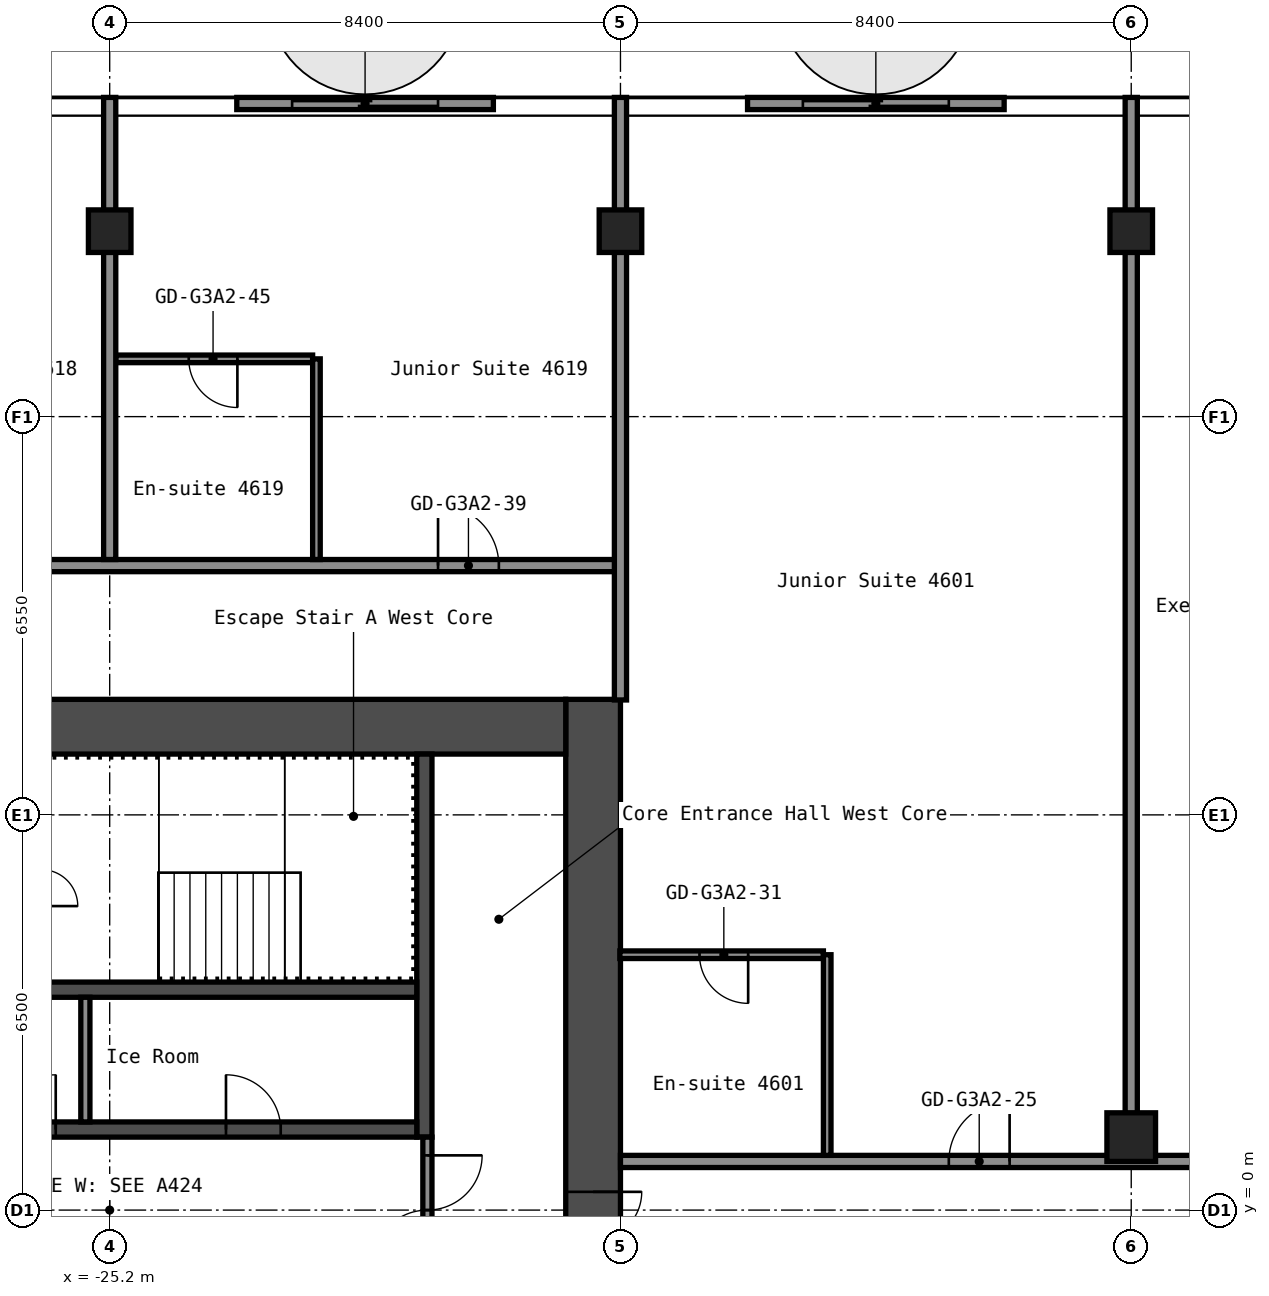
"""IFC4 building model, lengths in metres.
Left out: names, types, materials, properties, quantities, classifications, styles, units other than length and angle.
Written with IfcOpenShell. Run it as: python <this file> out.ifc"""

import sys

from ifc_helpers import new_model, si_unit, direction, frame, frame_2d, origin, origin_2d, place, context, subcontext, project, spatial, rectangle, hollow_rectangle, extrude, element, fill, save


model = new_model("IFC4")
c1 = context("Model", 3, precision=1e-05, world=origin(), true_north=direction((0.0, 1.0)))
c2 = subcontext(c1, "Body", "Model", "MODEL_VIEW")
j1 = project(units=[si_unit("LENGTHUNIT", "METRE"), si_unit("PLANEANGLEUNIT", "RADIAN")], contexts=[c1])
p1 = place(None, origin())
s1 = spatial("IfcSite", under=j1, at=p1, CompositionType="ELEMENT")
p2 = place(p1, origin())
s2 = spatial("IfcBuilding", under=s1, at=p2, CompositionType="ELEMENT")
p3 = place(p2, frame((0.0, 0.0, 163.0)))
s3 = spatial("IfcBuildingStorey", under=s2, at=p3, CompositionType="ELEMENT", Elevation=163.0)
for number, where, z_axis, x_axis in (
    (1, (-25.2, 16.1, 0.0), (0.0, 0.0, 1.0), (1.0, 0.0, 0.0)),
    (2, (-16.8, 16.1, 0.0), (0.0, 0.0, 1.0), (1.0, 0.0, 0.0)),
):
    element("IfcColumn", number, at=place(p3, frame(where, z_axis=z_axis, x_axis=x_axis)), inside=s3, PredefinedType="COLUMN", context=c2, shape_type="SweptSolid", body=[
        extrude(hollow_rectangle(XDim=0.7, YDim=0.7, WallThickness=0.028, at=origin_2d()), origin(), (0.0, 0.0, 1.0), 2.75),
    ])
p4 = place(p3, frame((-8.4, 1.2, 0.0), z_axis=(0.0, 0.0, 1.0), x_axis=(1.0, 0.0, 0.0)))
e3 = element("IfcColumn", 3, at=p4, inside=s3, PredefinedType="COLUMN", context=c2, shape_type="SweptSolid", body=[
    extrude(hollow_rectangle(XDim=0.8, YDim=0.8, WallThickness=0.032, at=origin_2d()), origin(), (0.0, 0.0, 1.0), 2.75),
])
p5 = place(p3, frame((-8.4, 16.1, 0.0), z_axis=(0.0, 0.0, 1.0), x_axis=(1.0, 0.0, 0.0)))
e4 = element("IfcColumn", 4, at=p5, inside=s3, PredefinedType="COLUMN", context=c2, shape_type="SweptSolid", body=[
    extrude(hollow_rectangle(XDim=0.7, YDim=0.7, WallThickness=0.028, at=origin_2d()), origin(), (0.0, 0.0, 1.0), 2.75),
])
p6 = place(p3, frame((-17.25, -8.4, 0.0), z_axis=(0.0, 0.0, 1.0), x_axis=(0.0, 1.0, 0.0)))
e5 = element("IfcWall", 5, at=p6, inside=s3, PredefinedType="SHEAR", context=c2, shape_type="SweptSolid", body=[
    extrude(rectangle(XDim=16.8, YDim=0.9, at=frame_2d((8.4, 0.0))), origin(), (0.0, 0.0, 1.0), 2.75),
])
p7 = place(p6, frame((7.1, 0.0, 0.0)))
e6 = element("IfcOpeningElement", 6, at=p7, cuts=e5, PredefinedType="OPENING", context=c2, shape_type="SweptSolid", body=[
    extrude(rectangle(XDim=1.6, YDim=2.1, at=frame_2d((0.8, 1.05))), frame((0.0, 0.46, 0.0), z_axis=(0.0, -1.0, 0.0), x_axis=(1.0, 0.0, 0.0)), (0.0, 0.0, 1.0), 0.92),
])
p8 = place(p3, frame((-32.7, 7.95, 0.0), z_axis=(0.0, 0.0, 1.0), x_axis=(1.0, 0.0, 0.0)))
e7 = element("IfcWall", 7, at=p8, inside=s3, PredefinedType="SHEAR", context=c2, shape_type="SweptSolid", body=[
    extrude(rectangle(XDim=15.0, YDim=0.9, at=frame_2d((7.5, 0.0))), origin(), (0.0, 0.0, 1.0), 2.75),
])
p9 = place(p8, frame((3.4, 0.0, 0.0)))
e8 = element("IfcOpeningElement", 8, at=p9, cuts=e7, PredefinedType="OPENING", context=c2, shape_type="SweptSolid", body=[
    extrude(rectangle(XDim=1.2, YDim=2.1, at=frame_2d((0.6, 1.05))), frame((0.0, 0.46, 0.0), z_axis=(0.0, -1.0, 0.0), x_axis=(1.0, 0.0, 0.0)), (0.0, 0.0, 1.0), 0.92),
])
p10 = place(p8, frame((0.75, 0.0, 0.0)))
e9 = element("IfcOpeningElement", 9, at=p10, cuts=e7, PredefinedType="OPENING", context=c2, shape_type="SweptSolid", body=[
    extrude(rectangle(XDim=0.9, YDim=2.1, at=frame_2d((0.45, 1.05))), frame((0.0, 0.46, 0.0), z_axis=(0.0, -1.0, 0.0), x_axis=(1.0, 0.0, 0.0)), (0.0, 0.0, 1.0), 0.92),
])
p11 = place(p3, frame((-20.025, 1.2, 0.0), z_axis=(0.0, 0.0, 1.0), x_axis=(0.0, 1.0, 0.0)))
e10 = element("IfcWall", 10, at=p11, inside=s3, PredefinedType="SHEAR", context=c2, shape_type="SweptSolid", body=[
    extrude(rectangle(XDim=6.3, YDim=0.25, at=frame_2d((3.15, 0.0))), origin(), (0.0, 0.0, 1.0), 2.75),
])
p12 = place(p3, frame((-27.65, 1.325, 0.0), z_axis=(0.0, 0.0, 1.0), x_axis=(1.0, 0.0, 0.0)))
e11 = element("IfcWall", 11, at=p12, inside=s3, PredefinedType="SHEAR", context=c2, shape_type="SweptSolid", body=[
    extrude(rectangle(XDim=7.5, YDim=0.25, at=frame_2d((3.75, 0.0))), origin(), (0.0, 0.0, 1.0), 2.75),
])
p13 = place(p12, frame((4.363, 0.0, 0.0)))
e12 = element("IfcOpeningElement", 12, at=p13, cuts=e11, PredefinedType="OPENING", context=c2, shape_type="SweptSolid", body=[
    extrude(rectangle(XDim=0.9, YDim=2.1, at=frame_2d((0.45, 1.05))), frame((0.0, 0.135, 0.0), z_axis=(0.0, -1.0, 0.0), x_axis=(1.0, 0.0, 0.0)), (0.0, 0.0, 1.0), 0.27),
])
p14 = place(p12, frame((0.663, 0.0, 0.0)))
e13 = element("IfcOpeningElement", 13, at=p14, cuts=e11, PredefinedType="OPENING", context=c2, shape_type="SweptSolid", body=[
    extrude(rectangle(XDim=0.9, YDim=2.1, at=frame_2d((0.45, 1.05))), frame((0.0, 0.135, 0.0), z_axis=(0.0, -1.0, 0.0), x_axis=(1.0, 0.0, 0.0)), (0.0, 0.0, 1.0), 0.27),
])
p15 = place(p3, frame((-27.65, 3.625, 0.0), z_axis=(0.0, 0.0, 1.0), x_axis=(1.0, 0.0, 0.0)))
e14 = element("IfcWall", 14, at=p15, inside=s3, PredefinedType="SHEAR", context=c2, shape_type="SweptSolid", body=[
    extrude(rectangle(XDim=7.5, YDim=0.25, at=frame_2d((3.75, 0.0))), origin(), (0.0, 0.0, 1.0), 2.75),
])
p16 = place(p3, frame((-19.975, -1.2, 0.0), z_axis=(0.0, 0.0, 1.0), x_axis=(0.0, 1.0, 0.0)))
e15 = element("IfcWall", 15, at=p16, inside=s3, PredefinedType="PARTITIONING", context=c2, shape_type="SweptSolid", body=[
    extrude(rectangle(XDim=2.4, YDim=0.15, at=frame_2d((1.2, 0.0))), origin(), (0.0, 0.0, 1.0), 2.75),
])
p17 = place(p16, frame((0.3, 0.0, 0.0)))
e16 = element("IfcOpeningElement", 16, at=p17, cuts=e15, PredefinedType="OPENING", context=c2, shape_type="SweptSolid", body=[
    extrude(rectangle(XDim=1.8, YDim=2.1, at=frame_2d((0.9, 1.05))), frame((0.0, 0.085, 0.0), z_axis=(0.0, -1.0, 0.0), x_axis=(1.0, 0.0, 0.0)), (0.0, 0.0, 1.0), 0.17),
])
p18 = place(p3, frame((-25.6, 1.45, 0.0), z_axis=(0.0, 0.0, 1.0), x_axis=(0.0, 1.0, 0.0)))
e17 = element("IfcWall", 17, at=p18, inside=s3, PredefinedType="PARTITIONING", context=c2, shape_type="SweptSolid", body=[
    extrude(rectangle(XDim=2.05, YDim=0.15, at=frame_2d((1.025, 0.0))), origin(), (0.0, 0.0, 1.0), 2.75),
])
p19 = place(p3, frame((-16.8, 0.8, 0.0), z_axis=(0.0, 0.0, 1.0), x_axis=(1.0, 0.0, 0.0)))
e18 = element("IfcWall", 18, at=p19, inside=s3, PredefinedType="PARTITIONING", context=c2, shape_type="SweptSolid", body=[
    extrude(rectangle(XDim=33.6, YDim=0.2, at=frame_2d((16.8, 0.0))), origin(), (0.0, 0.0, 1.0), 2.75),
])
p20 = place(p19, frame((5.4, 0.0, 0.0)))
e19 = element("IfcOpeningElement", 19, at=p20, cuts=e18, PredefinedType="OPENING", context=c2, shape_type="SweptSolid", body=[
    extrude(rectangle(XDim=1.0, YDim=2.1, at=frame_2d((0.5, 1.05))), frame((0.0, 0.11, 0.0), z_axis=(0.0, -1.0, 0.0), x_axis=(1.0, 0.0, 0.0)), (0.0, 0.0, 1.0), 0.22),
])
p21 = place(p19, frame((9.88, 0.0, 0.0)))
e20 = element("IfcOpeningElement", 20, at=p21, cuts=e18, PredefinedType="OPENING", context=c2, shape_type="SweptSolid", body=[
    extrude(rectangle(XDim=0.9, YDim=2.1, at=frame_2d((0.45, 1.05))), frame((0.0, 0.11, 0.0), z_axis=(0.0, -1.0, 0.0), x_axis=(1.0, 0.0, 0.0)), (0.0, 0.0, 1.0), 0.22),
])
p22 = place(p19, frame((14.08, 0.0, 0.0)))
e21 = element("IfcOpeningElement", 21, at=p22, cuts=e18, PredefinedType="OPENING", context=c2, shape_type="SweptSolid", body=[
    extrude(rectangle(XDim=0.9, YDim=2.1, at=frame_2d((0.45, 1.05))), frame((0.0, 0.11, 0.0), z_axis=(0.0, -1.0, 0.0), x_axis=(1.0, 0.0, 0.0)), (0.0, 0.0, 1.0), 0.22),
])
p23 = place(p19, frame((18.7, 0.0, 0.0)))
e22 = element("IfcOpeningElement", 22, at=p23, cuts=e18, PredefinedType="OPENING", context=c2, shape_type="SweptSolid", body=[
    extrude(rectangle(XDim=0.9, YDim=2.1, at=frame_2d((0.45, 1.05))), frame((0.0, 0.11, 0.0), z_axis=(0.0, -1.0, 0.0), x_axis=(1.0, 0.0, 0.0)), (0.0, 0.0, 1.0), 0.22),
])
p24 = place(p19, frame((22.9, 0.0, 0.0)))
e23 = element("IfcOpeningElement", 23, at=p24, cuts=e18, PredefinedType="OPENING", context=c2, shape_type="SweptSolid", body=[
    extrude(rectangle(XDim=0.9, YDim=2.1, at=frame_2d((0.45, 1.05))), frame((0.0, 0.11, 0.0), z_axis=(0.0, -1.0, 0.0), x_axis=(1.0, 0.0, 0.0)), (0.0, 0.0, 1.0), 0.22),
])
p25 = place(p19, frame((30.6, 0.0, 0.0)))
e24 = element("IfcOpeningElement", 24, at=p25, cuts=e18, PredefinedType="OPENING", context=c2, shape_type="SweptSolid", body=[
    extrude(rectangle(XDim=1.0, YDim=2.1, at=frame_2d((0.5, 1.05))), frame((0.0, 0.11, 0.0), z_axis=(0.0, -1.0, 0.0), x_axis=(1.0, 0.0, 0.0)), (0.0, 0.0, 1.0), 0.22),
])
p26 = place(p3, frame((-16.81, 4.2, 0.0), z_axis=(0.0, 0.0, 1.0), x_axis=(1.0, 0.0, 0.0)))
e25 = element("IfcWall", 25, at=p26, inside=s3, PredefinedType="PARTITIONING", context=c2, shape_type="SweptSolid", body=[
    extrude(rectangle(XDim=3.348, YDim=0.125, at=frame_2d((1.674, 0.0))), origin(), (0.0, 0.0, 1.0), 2.75),
])
p27 = place(p26, frame((1.31, 0.0, 0.0)))
e26 = element("IfcOpeningElement", 26, at=p27, cuts=e25, PredefinedType="OPENING", context=c2, shape_type="SweptSolid", body=[
    extrude(rectangle(XDim=0.8, YDim=2.1, at=frame_2d((0.4, 1.05))), frame((0.0, 0.073, 0.0), z_axis=(0.0, -1.0, 0.0), x_axis=(1.0, 0.0, 0.0)), (0.0, 0.0, 1.0), 0.145),
])
p28 = place(p3, frame((-42.7, 10.6, 0.0), z_axis=(0.0, 0.0, 1.0), x_axis=(1.0, 0.0, 0.0)))
e27 = element("IfcWall", 27, at=p28, inside=s3, PredefinedType="PARTITIONING", context=c2, shape_type="SweptSolid", body=[
    extrude(rectangle(XDim=25.9, YDim=0.2, at=frame_2d((12.95, 0.0))), origin(), (0.0, 0.0, 1.0), 2.75),
])
p29 = place(p28, frame((5.9, 0.0, 0.0)))
e28 = element("IfcOpeningElement", 28, at=p29, cuts=e27, PredefinedType="OPENING", context=c2, shape_type="SweptSolid", body=[
    extrude(rectangle(XDim=1.0, YDim=2.1, at=frame_2d((0.5, 1.05))), frame((0.0, 0.11, 0.0), z_axis=(0.0, -1.0, 0.0), x_axis=(1.0, 0.0, 0.0)), (0.0, 0.0, 1.0), 0.22),
])
p30 = place(p28, frame((14.5, 0.0, 0.0)))
e29 = element("IfcOpeningElement", 29, at=p30, cuts=e27, PredefinedType="OPENING", context=c2, shape_type="SweptSolid", body=[
    extrude(rectangle(XDim=1.0, YDim=2.1, at=frame_2d((0.5, 1.05))), frame((0.0, 0.11, 0.0), z_axis=(0.0, -1.0, 0.0), x_axis=(1.0, 0.0, 0.0)), (0.0, 0.0, 1.0), 0.22),
])
p31 = place(p28, frame((22.9, 0.0, 0.0)))
e30 = element("IfcOpeningElement", 30, at=p31, cuts=e27, PredefinedType="OPENING", context=c2, shape_type="SweptSolid", body=[
    extrude(rectangle(XDim=1.0, YDim=2.1, at=frame_2d((0.5, 1.05))), frame((0.0, 0.11, 0.0), z_axis=(0.0, -1.0, 0.0), x_axis=(1.0, 0.0, 0.0)), (0.0, 0.0, 1.0), 0.22),
])
p32 = place(p3, frame((-25.1, 14.0, 0.0), z_axis=(0.0, 0.0, 1.0), x_axis=(1.0, 0.0, 0.0)))
e31 = element("IfcWall", 31, at=p32, inside=s3, PredefinedType="PARTITIONING", context=c2, shape_type="SweptSolid", body=[
    extrude(rectangle(XDim=3.238, YDim=0.125, at=frame_2d((1.619, 0.0))), origin(), (0.0, 0.0, 1.0), 2.75),
])
p33 = place(p32, frame((1.2, 0.0, 0.0)))
e32 = element("IfcOpeningElement", 32, at=p33, cuts=e31, PredefinedType="OPENING", context=c2, shape_type="SweptSolid", body=[
    extrude(rectangle(XDim=0.8, YDim=2.1, at=frame_2d((0.4, 1.05))), frame((0.0, 0.073, 0.0), z_axis=(0.0, -1.0, 0.0), x_axis=(1.0, 0.0, 0.0)), (0.0, 0.0, 1.0), 0.145),
])
p34 = place(p3, frame((-25.2, 10.7, 0.0), z_axis=(0.0, 0.0, 1.0), x_axis=(0.0, 1.0, 0.0)))
e33 = element("IfcWall", 33, at=p34, inside=s3, PredefinedType="PARTITIONING", context=c2, shape_type="SweptSolid", body=[
    extrude(rectangle(XDim=7.6, YDim=0.2, at=frame_2d((3.8, 0.0))), origin(), (0.0, 0.0, 1.0), 2.75),
])
p35 = place(p3, frame((-21.8, 10.7, 0.0), z_axis=(0.0, 0.0, 1.0), x_axis=(0.0, 1.0, 0.0)))
e34 = element("IfcWall", 34, at=p35, inside=s3, PredefinedType="PARTITIONING", context=c2, shape_type="SweptSolid", body=[
    extrude(rectangle(XDim=3.3, YDim=0.125, at=frame_2d((1.65, 0.0))), origin(), (0.0, 0.0, 1.0), 2.75),
])
p36 = place(p3, frame((-16.8, 8.39, 0.0), z_axis=(0.0, 0.0, 1.0), x_axis=(0.0, 1.0, 0.0)))
e35 = element("IfcWall", 35, at=p36, inside=s3, PredefinedType="PARTITIONING", context=c2, shape_type="SweptSolid", body=[
    extrude(rectangle(XDim=9.91, YDim=0.2, at=frame_2d((4.955, 0.0))), origin(), (0.0, 0.0, 1.0), 2.75),
])
p37 = place(p3, frame((-13.4, 0.9, 0.0), z_axis=(0.0, 0.0, 1.0), x_axis=(0.0, 1.0, 0.0)))
e36 = element("IfcWall", 36, at=p37, inside=s3, PredefinedType="PARTITIONING", context=c2, shape_type="SweptSolid", body=[
    extrude(rectangle(XDim=3.3, YDim=0.125, at=frame_2d((1.65, 0.0))), origin(), (0.0, 0.0, 1.0), 2.75),
])
p38 = place(p3, frame((-8.4, 1.59, 0.0), z_axis=(0.0, 0.0, 1.0), x_axis=(0.0, 1.0, 0.0)))
e37 = element("IfcWall", 37, at=p38, inside=s3, PredefinedType="PARTITIONING", context=c2, shape_type="SweptSolid", body=[
    extrude(rectangle(XDim=16.71, YDim=0.2, at=frame_2d((8.355, 0.0))), origin(), (0.0, 0.0, 1.0), 2.75),
])
p39 = place(p3, frame((-10.49, 18.2, 0.0), z_axis=(0.0, 0.0, 1.0), x_axis=(-1.0, 0.0, 0.0)))
p40 = place(p39, frame((0.91, 0.0, 0.0)))
p41 = place(p40, frame((2.4, 0.0, 0.0), z_axis=(0.0, 0.0, 1.0), x_axis=(-1.0, 0.0, 0.0)))
e38 = element("IfcDoor", 38, at=p41, inside=s3, OperationType="SLIDING_TO_LEFT", PredefinedType="DOOR", context=c2, shape_type="SweptSolid", body=[
    extrude(rectangle(XDim=2.4, YDim=2.2, at=frame_2d((1.2, 1.1))), frame((0.0, 0.025, 0.0), z_axis=(0.0, -1.0, 0.0), x_axis=(1.0, 0.0, 0.0)), (0.0, 0.0, 1.0), 0.05),
])
p42 = place(p3, frame((-18.89, 18.2, 0.0), z_axis=(0.0, 0.0, 1.0), x_axis=(-1.0, 0.0, 0.0)))
p43 = place(p42, frame((0.91, 0.0, 0.0)))
p44 = place(p43, frame((2.4, 0.0, 0.0), z_axis=(0.0, 0.0, 1.0), x_axis=(-1.0, 0.0, 0.0)))
e39 = element("IfcDoor", 39, at=p44, inside=s3, OperationType="SLIDING_TO_LEFT", PredefinedType="DOOR", context=c2, shape_type="SweptSolid", body=[
    extrude(rectangle(XDim=2.4, YDim=2.2, at=frame_2d((1.2, 1.1))), frame((0.0, 0.025, 0.0), z_axis=(0.0, -1.0, 0.0), x_axis=(1.0, 0.0, 0.0)), (0.0, 0.0, 1.0), 0.05),
])
p45 = place(p7, origin())
e40 = element("IfcDoor", 40, at=p45, inside=s3, OperationType="DOUBLE_DOOR_SINGLE_SWING", PredefinedType="DOOR", context=c2, shape_type="SweptSolid", body=[
    extrude(rectangle(XDim=1.6, YDim=2.1, at=frame_2d((0.8, 1.05))), frame((0.0, 0.025, 0.0), z_axis=(0.0, -1.0, 0.0), x_axis=(1.0, 0.0, 0.0)), (0.0, 0.0, 1.0), 0.05),
])
fill(e6, e40)
p46 = place(p17, origin())
e41 = element("IfcDoor", 41, at=p46, inside=s3, OperationType="DOUBLE_DOOR_SINGLE_SWING", PredefinedType="DOOR", context=c2, shape_type="SweptSolid", body=[
    extrude(rectangle(XDim=1.8, YDim=2.1, at=frame_2d((0.9, 1.05))), frame((0.0, 0.025, 0.0), z_axis=(0.0, -1.0, 0.0), x_axis=(1.0, 0.0, 0.0)), (0.0, 0.0, 1.0), 0.05),
])
fill(e16, e41)
p47 = place(p13, origin())
e42 = element("IfcDoor", 42, at=p47, inside=s3, OperationType="SINGLE_SWING_RIGHT", PredefinedType="DOOR", context=c2, shape_type="SweptSolid", body=[
    extrude(rectangle(XDim=0.9, YDim=2.1, at=frame_2d((0.45, 1.05))), frame((0.0, 0.025, 0.0), z_axis=(0.0, -1.0, 0.0), x_axis=(1.0, 0.0, 0.0)), (0.0, 0.0, 1.0), 0.05),
])
fill(e12, e42)
p48 = place(p14, origin())
e43 = element("IfcDoor", 43, at=p48, inside=s3, OperationType="SINGLE_SWING_LEFT", PredefinedType="DOOR", context=c2, shape_type="SweptSolid", body=[
    extrude(rectangle(XDim=0.9, YDim=2.1, at=frame_2d((0.45, 1.05))), frame((0.0, 0.025, 0.0), z_axis=(0.0, -1.0, 0.0), x_axis=(1.0, 0.0, 0.0)), (0.0, 0.0, 1.0), 0.05),
])
fill(e13, e43)
p49 = place(p20, origin())
e44 = element("IfcDoor", 44, at=p49, inside=s3, OperationType="SINGLE_SWING_LEFT", PredefinedType="DOOR", context=c2, shape_type="SweptSolid", body=[
    extrude(rectangle(XDim=1.0, YDim=2.1, at=frame_2d((0.5, 1.05))), frame((0.0, 0.025, 0.0), z_axis=(0.0, -1.0, 0.0), x_axis=(1.0, 0.0, 0.0)), (0.0, 0.0, 1.0), 0.05),
])
fill(e19, e44)
p50 = place(p27, origin())
e45 = element("IfcDoor", 45, at=p50, inside=s3, OperationType="SINGLE_SWING_RIGHT", PredefinedType="DOOR", context=c2, shape_type="SweptSolid", body=[
    extrude(rectangle(XDim=0.8, YDim=2.1, at=frame_2d((0.4, 1.05))), frame((0.0, 0.025, 0.0), z_axis=(0.0, -1.0, 0.0), x_axis=(1.0, 0.0, 0.0)), (0.0, 0.0, 1.0), 0.05),
])
fill(e26, e45)
p51 = place(p31, origin())
e46 = element("IfcDoor", 46, at=p51, inside=s3, OperationType="SINGLE_SWING_RIGHT", PredefinedType="DOOR", context=c2, shape_type="SweptSolid", body=[
    extrude(rectangle(XDim=1.0, YDim=2.1, at=frame_2d((0.5, 1.05))), frame((0.0, 0.025, 0.0), z_axis=(0.0, -1.0, 0.0), x_axis=(1.0, 0.0, 0.0)), (0.0, 0.0, 1.0), 0.05),
])
fill(e30, e46)
p52 = place(p33, origin())
e47 = element("IfcDoor", 47, at=p52, inside=s3, OperationType="SINGLE_SWING_RIGHT", PredefinedType="DOOR", context=c2, shape_type="SweptSolid", body=[
    extrude(rectangle(XDim=0.8, YDim=2.1, at=frame_2d((0.4, 1.05))), frame((0.0, 0.025, 0.0), z_axis=(0.0, -1.0, 0.0), x_axis=(1.0, 0.0, 0.0)), (0.0, 0.0, 1.0), 0.05),
])
fill(e32, e47)
save(model, sys.argv[1])
